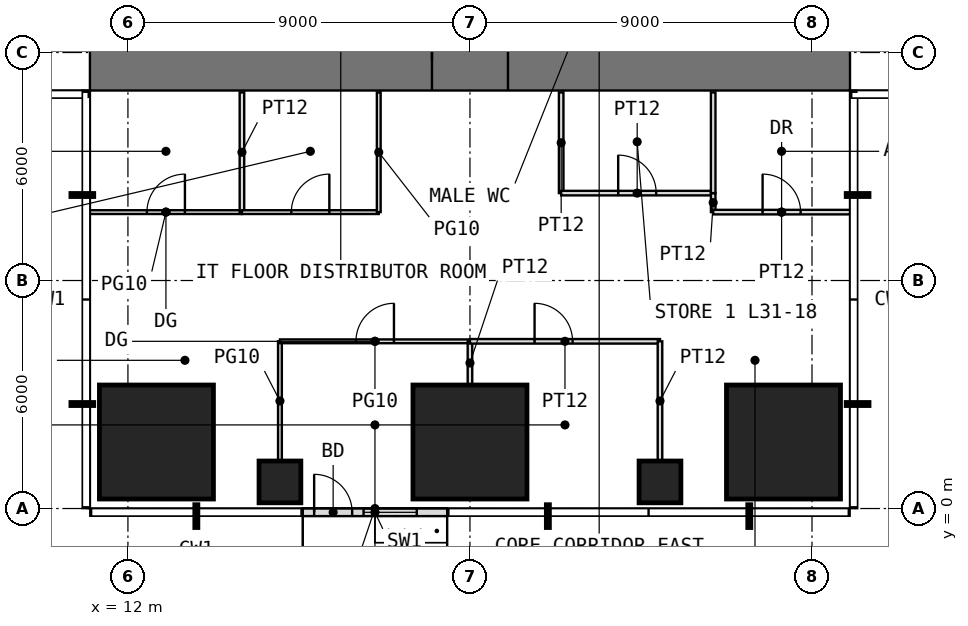
"""IFC4 building model, lengths in metres.
Left out: names, types, materials, properties, quantities, classifications, styles, units other than length and angle.
Written with IfcOpenShell. Run it as: python <this file> out.ifc"""

import sys

from ifc_helpers import new_model, si_unit, direction, frame, frame_2d, origin, origin_2d, place, context, subcontext, project, spatial, rectangle, extrude, element, fill, save


model = new_model("IFC4")
c1 = context("Model", 3, precision=1e-05, world=origin(), true_north=direction((0.0, 1.0)))
c2 = subcontext(c1, "Body", "Model", "MODEL_VIEW")
j1 = project(units=[si_unit("LENGTHUNIT", "METRE"), si_unit("PLANEANGLEUNIT", "RADIAN")], contexts=[c1])
p1 = place(None, origin())
s1 = spatial("IfcSite", under=j1, at=p1, CompositionType="ELEMENT")
p2 = place(p1, origin())
s2 = spatial("IfcBuilding", under=s1, at=p2, CompositionType="ELEMENT")
p3 = place(p2, frame((0.0, 0.0, 132.5)))
s3 = spatial("IfcBuildingStorey", under=s2, at=p3, CompositionType="ELEMENT", Elevation=132.5)
p4 = place(p3, frame((12.75, 1.75, 0.0), z_axis=(0.0, 0.0, 1.0), x_axis=(1.0, 0.0, 0.0)))
e1 = element("IfcColumn", 1, at=p4, inside=s3, PredefinedType="COLUMN", context=c2, shape_type="SweptSolid", body=[
    extrude(rectangle(XDim=3.0, YDim=3.0, at=origin_2d()), origin(), (0.0, 0.0, 1.0), 4.0),
])
p5 = place(p3, frame((16.0, 0.7, 0.0), z_axis=(0.0, 0.0, 1.0), x_axis=(1.0, 0.0, 0.0)))
e2 = element("IfcColumn", 2, at=p5, inside=s3, PredefinedType="COLUMN", context=c2, shape_type="SweptSolid", body=[
    extrude(rectangle(XDim=1.1, YDim=1.1, at=origin_2d()), origin(), (0.0, 0.0, 1.0), 4.0),
])
p6 = place(p3, frame((21.0, 1.75, 0.0), z_axis=(0.0, 0.0, 1.0), x_axis=(1.0, 0.0, 0.0)))
e3 = element("IfcColumn", 3, at=p6, inside=s3, PredefinedType="COLUMN", context=c2, shape_type="SweptSolid", body=[
    extrude(rectangle(XDim=3.0, YDim=3.0, at=origin_2d()), origin(), (0.0, 0.0, 1.0), 4.0),
])
p7 = place(p3, frame((26.0, 0.7, 0.0), z_axis=(0.0, 0.0, 1.0), x_axis=(1.0, 0.0, 0.0)))
e4 = element("IfcColumn", 4, at=p7, inside=s3, PredefinedType="COLUMN", context=c2, shape_type="SweptSolid", body=[
    extrude(rectangle(XDim=1.1, YDim=1.1, at=origin_2d()), origin(), (0.0, 0.0, 1.0), 4.0),
])
p8 = place(p3, frame((29.25, 1.75, 0.0), z_axis=(0.0, 0.0, 1.0), x_axis=(1.0, 0.0, 0.0)))
e5 = element("IfcColumn", 5, at=p8, inside=s3, PredefinedType="COLUMN", context=c2, shape_type="SweptSolid", body=[
    extrude(rectangle(XDim=3.0, YDim=3.0, at=origin_2d()), origin(), (0.0, 0.0, 1.0), 4.0),
])
p9 = place(p3, frame((16.6, -0.1, 0.0), z_axis=(0.0, 0.0, 1.0), x_axis=(1.0, 0.0, 0.0)))
e6 = element("IfcWall", 6, at=p9, inside=s3, PredefinedType="USERDEFINED", context=c2, shape_type="SweptSolid", body=[
    extrude(rectangle(XDim=3.8, YDim=0.2, at=frame_2d((1.9, 0.0))), origin(), (0.0, 0.0, 1.0), 3.75),
])
p10 = place(p9, frame((0.3, 0.0, 0.0)))
e7 = element("IfcOpeningElement", 7, at=p10, cuts=e6, PredefinedType="OPENING", context=c2, shape_type="SweptSolid", body=[
    extrude(rectangle(XDim=1.0, YDim=2.4, at=frame_2d((0.5, 1.2))), frame((0.0, 0.11, 0.0), z_axis=(0.0, -1.0, 0.0), x_axis=(1.0, 0.0, 0.0)), (0.0, 0.0, 1.0), 0.22),
])
p11 = place(p9, frame((1.6, 0.0, 0.3)))
e8 = element("IfcOpeningElement", 8, at=p11, cuts=e6, PredefinedType="OPENING", context=c2, shape_type="SweptSolid", body=[
    extrude(rectangle(XDim=1.4, YDim=2.7, at=frame_2d((0.7, 1.35))), frame((0.0, 0.11, 0.0), z_axis=(0.0, -1.0, 0.0), x_axis=(1.0, 0.0, 0.0)), (0.0, 0.0, 1.0), 0.22),
])
p12 = place(p3, frame((11.0, 11.8, -0.05), z_axis=(0.0, 0.0, 1.0), x_axis=(1.0, 0.0, 0.0)))
e9 = element("IfcWall", 9, at=p12, inside=s3, PredefinedType="SHEAR", context=c2, shape_type="SweptSolid", body=[
    extrude(rectangle(XDim=20.0, YDim=1.6, at=frame_2d((10.0, 0.0))), origin(), (0.0, 0.0, 1.0), 4.0),
])
p13 = place(p12, frame((9.0, 0.0, 0.05)))
e10 = element("IfcOpeningElement", 10, at=p13, cuts=e9, PredefinedType="OPENING", context=c2, shape_type="SweptSolid", body=[
    extrude(rectangle(XDim=2.0, YDim=2.2, at=frame_2d((1.0, 1.1))), frame((0.0, 0.81, 0.0), z_axis=(0.0, -1.0, 0.0), x_axis=(1.0, 0.0, 0.0)), (0.0, 0.0, 1.0), 1.62),
])
p14 = place(p3, frame((11.0, 7.8, 0.0), z_axis=(0.0, 0.0, 1.0), x_axis=(1.0, 0.0, 0.0)))
e11 = element("IfcWall", 11, at=p14, inside=s3, PredefinedType="PARTITIONING", context=c2, shape_type="SweptSolid", body=[
    extrude(rectangle(XDim=4.0, YDim=0.1, at=frame_2d((2.0, 0.0))), origin(), (0.0, 0.0, 1.0), 3.75),
])
p15 = place(p14, frame((1.5, 0.0, 0.0)))
e12 = element("IfcOpeningElement", 12, at=p15, cuts=e11, PredefinedType="OPENING", context=c2, shape_type="SweptSolid", body=[
    extrude(rectangle(XDim=1.0, YDim=2.4, at=frame_2d((0.5, 1.2))), frame((0.0, 0.06, 0.0), z_axis=(0.0, -1.0, 0.0), x_axis=(1.0, 0.0, 0.0)), (0.0, 0.0, 1.0), 0.12),
])
p16 = place(p3, frame((15.0, 7.8, 0.0), z_axis=(0.0, 0.0, 1.0), x_axis=(0.0, 1.0, 0.0)))
e13 = element("IfcWall", 13, at=p16, inside=s3, PredefinedType="PARTITIONING", context=c2, shape_type="SweptSolid", body=[
    extrude(rectangle(XDim=3.15, YDim=0.12, at=frame_2d((1.575, 0.0))), origin(), (0.0, 0.0, 1.0), 3.75),
])
p17 = place(p3, frame((15.0, 7.8, 0.0), z_axis=(0.0, 0.0, 1.0), x_axis=(1.0, 0.0, 0.0)))
e14 = element("IfcWall", 14, at=p17, inside=s3, PredefinedType="PARTITIONING", context=c2, shape_type="SweptSolid", body=[
    extrude(rectangle(XDim=3.6, YDim=0.1, at=frame_2d((1.8, 0.0))), origin(), (0.0, 0.0, 1.0), 3.75),
])
p18 = place(p17, frame((1.3, 0.0, 0.0)))
e15 = element("IfcOpeningElement", 15, at=p18, cuts=e14, PredefinedType="OPENING", context=c2, shape_type="SweptSolid", body=[
    extrude(rectangle(XDim=1.0, YDim=2.4, at=frame_2d((0.5, 1.2))), frame((0.0, 0.06, 0.0), z_axis=(0.0, -1.0, 0.0), x_axis=(1.0, 0.0, 0.0)), (0.0, 0.0, 1.0), 0.12),
])
p19 = place(p3, frame((16.0, 1.26, 0.0), z_axis=(0.0, 0.0, 1.0), x_axis=(0.0, 1.0, 0.0)))
e16 = element("IfcWall", 16, at=p19, inside=s3, PredefinedType="PARTITIONING", context=c2, shape_type="SweptSolid", body=[
    extrude(rectangle(XDim=3.14, YDim=0.1, at=frame_2d((1.57, 0.0))), origin(), (0.0, 0.0, 1.0), 3.75),
])
p20 = place(p3, frame((16.0, 4.4, 0.0), z_axis=(0.0, 0.0, 1.0), x_axis=(1.0, 0.0, 0.0)))
e17 = element("IfcWall", 17, at=p20, inside=s3, PredefinedType="PARTITIONING", context=c2, shape_type="SweptSolid", body=[
    extrude(rectangle(XDim=5.0, YDim=0.1, at=frame_2d((2.5, 0.0))), origin(), (0.0, 0.0, 1.0), 3.75),
])
p21 = place(p20, frame((2.0, 0.0, 0.0)))
e18 = element("IfcOpeningElement", 18, at=p21, cuts=e17, PredefinedType="OPENING", context=c2, shape_type="SweptSolid", body=[
    extrude(rectangle(XDim=1.0, YDim=2.4, at=frame_2d((0.5, 1.2))), frame((0.0, 0.06, 0.0), z_axis=(0.0, -1.0, 0.0), x_axis=(1.0, 0.0, 0.0)), (0.0, 0.0, 1.0), 0.12),
])
p22 = place(p3, frame((18.6, 7.8, 0.0), z_axis=(0.0, 0.0, 1.0), x_axis=(0.0, 1.0, 0.0)))
e19 = element("IfcWall", 19, at=p22, inside=s3, PredefinedType="PARTITIONING", context=c2, shape_type="SweptSolid", body=[
    extrude(rectangle(XDim=3.15, YDim=0.1, at=frame_2d((1.575, 0.0))), origin(), (0.0, 0.0, 1.0), 3.75),
])
p23 = place(p3, frame((21.0, 3.26, 0.0), z_axis=(0.0, 0.0, 1.0), x_axis=(0.0, 1.0, 0.0)))
e20 = element("IfcWall", 20, at=p23, inside=s3, PredefinedType="PARTITIONING", context=c2, shape_type="SweptSolid", body=[
    extrude(rectangle(XDim=1.14, YDim=0.12, at=frame_2d((0.57, 0.0))), origin(), (0.0, 0.0, 1.0), 3.75),
])
p24 = place(p3, frame((21.0, 4.4, 0.0), z_axis=(0.0, 0.0, 1.0), x_axis=(1.0, 0.0, 0.0)))
e21 = element("IfcWall", 21, at=p24, inside=s3, PredefinedType="PARTITIONING", context=c2, shape_type="SweptSolid", body=[
    extrude(rectangle(XDim=5.0, YDim=0.12, at=frame_2d((2.5, 0.0))), origin(), (0.0, 0.0, 1.0), 3.75),
])
p25 = place(p24, frame((1.7, 0.0, 0.0)))
e22 = element("IfcOpeningElement", 22, at=p25, cuts=e21, PredefinedType="OPENING", context=c2, shape_type="SweptSolid", body=[
    extrude(rectangle(XDim=1.0, YDim=2.2, at=frame_2d((0.5, 1.1))), frame((0.0, 0.07, 0.0), z_axis=(0.0, -1.0, 0.0), x_axis=(1.0, 0.0, 0.0)), (0.0, 0.0, 1.0), 0.14),
])
p26 = place(p3, frame((23.4, 8.3, 0.0), z_axis=(0.0, 0.0, 1.0), x_axis=(0.0, 1.0, 0.0)))
e23 = element("IfcWall", 23, at=p26, inside=s3, PredefinedType="PARTITIONING", context=c2, shape_type="SweptSolid", body=[
    extrude(rectangle(XDim=2.65, YDim=0.12, at=frame_2d((1.325, 0.0))), origin(), (0.0, 0.0, 1.0), 3.75),
])
p27 = place(p3, frame((23.4, 8.3, 0.0), z_axis=(0.0, 0.0, 1.0), x_axis=(1.0, 0.0, 0.0)))
e24 = element("IfcWall", 24, at=p27, inside=s3, PredefinedType="PARTITIONING", context=c2, shape_type="SweptSolid", body=[
    extrude(rectangle(XDim=4.0, YDim=0.12, at=frame_2d((2.0, 0.0))), origin(), (0.0, 0.0, 1.0), 3.75),
])
p28 = place(p27, frame((1.5, 0.0, 0.0)))
e25 = element("IfcOpeningElement", 25, at=p28, cuts=e24, PredefinedType="OPENING", context=c2, shape_type="SweptSolid", body=[
    extrude(rectangle(XDim=1.0, YDim=2.2, at=frame_2d((0.5, 1.1))), frame((0.0, 0.07, 0.0), z_axis=(0.0, -1.0, 0.0), x_axis=(1.0, 0.0, 0.0)), (0.0, 0.0, 1.0), 0.14),
])
p29 = place(p3, frame((26.0, 1.26, 0.0), z_axis=(0.0, 0.0, 1.0), x_axis=(0.0, 1.0, 0.0)))
e26 = element("IfcWall", 26, at=p29, inside=s3, PredefinedType="PARTITIONING", context=c2, shape_type="SweptSolid", body=[
    extrude(rectangle(XDim=3.14, YDim=0.12, at=frame_2d((1.57, 0.0))), origin(), (0.0, 0.0, 1.0), 3.75),
])
p30 = place(p3, frame((27.4, 7.8, 0.0), z_axis=(0.0, 0.0, 1.0), x_axis=(0.0, 1.0, 0.0)))
e27 = element("IfcWall", 27, at=p30, inside=s3, PredefinedType="PARTITIONING", context=c2, shape_type="SweptSolid", body=[
    extrude(rectangle(XDim=0.5, YDim=0.12, at=frame_2d((0.25, 0.0))), origin(), (0.0, 0.0, 1.0), 3.75),
])
p31 = place(p3, frame((27.4, 7.8, 0.0), z_axis=(0.0, 0.0, 1.0), x_axis=(1.0, 0.0, 0.0)))
e28 = element("IfcWall", 28, at=p31, inside=s3, PredefinedType="PARTITIONING", context=c2, shape_type="SweptSolid", body=[
    extrude(rectangle(XDim=3.6, YDim=0.12, at=frame_2d((1.8, 0.0))), origin(), (0.0, 0.0, 1.0), 3.75),
])
p32 = place(p31, frame((1.3, 0.0, 0.0)))
e29 = element("IfcOpeningElement", 29, at=p32, cuts=e28, PredefinedType="OPENING", context=c2, shape_type="SweptSolid", body=[
    extrude(rectangle(XDim=1.0, YDim=2.2, at=frame_2d((0.5, 1.1))), frame((0.0, 0.07, 0.0), z_axis=(0.0, -1.0, 0.0), x_axis=(1.0, 0.0, 0.0)), (0.0, 0.0, 1.0), 0.14),
])
p33 = place(p3, frame((27.4, 8.3, 0.0), z_axis=(0.0, 0.0, 1.0), x_axis=(0.0, 1.0, 0.0)))
e30 = element("IfcWall", 30, at=p33, inside=s3, PredefinedType="PARTITIONING", context=c2, shape_type="SweptSolid", body=[
    extrude(rectangle(XDim=2.65, YDim=0.12, at=frame_2d((1.325, 0.0))), origin(), (0.0, 0.0, 1.0), 3.75),
])
p34 = place(p10, origin())
e31 = element("IfcDoor", 31, at=p34, inside=s3, OperationType="SINGLE_SWING_LEFT", PredefinedType="DOOR", context=c2, shape_type="SweptSolid", body=[
    extrude(rectangle(XDim=1.0, YDim=2.4, at=frame_2d((0.5, 1.2))), frame((0.0, 0.025, 0.0), z_axis=(0.0, -1.0, 0.0), x_axis=(1.0, 0.0, 0.0)), (0.0, 0.0, 1.0), 0.05),
])
fill(e7, e31)
p35 = place(p11, origin())
e32 = element("IfcWindow", 32, at=p35, inside=s3, PartitioningType="SINGLE_PANEL", PredefinedType="WINDOW", context=c2, shape_type="SweptSolid", body=[
    extrude(rectangle(XDim=1.4, YDim=2.7, at=frame_2d((0.7, 1.35))), frame((0.0, 0.03, 0.0), z_axis=(0.0, -1.0, 0.0), x_axis=(1.0, 0.0, 0.0)), (0.0, 0.0, 1.0), 0.06),
])
fill(e8, e32)
p36 = place(p13, origin())
e33 = element("IfcDoor", 33, at=p36, inside=s3, OperationType="DOUBLE_DOOR_SINGLE_SWING", PredefinedType="DOOR", context=c2, shape_type="SweptSolid", body=[
    extrude(rectangle(XDim=2.0, YDim=2.2, at=frame_2d((1.0, 1.1))), frame((0.0, 0.025, 0.0), z_axis=(0.0, -1.0, 0.0), x_axis=(1.0, 0.0, 0.0)), (0.0, 0.0, 1.0), 0.05),
])
fill(e10, e33)
p37 = place(p15, origin())
e34 = element("IfcDoor", 34, at=p37, inside=s3, OperationType="SINGLE_SWING_RIGHT", PredefinedType="DOOR", context=c2, shape_type="SweptSolid", body=[
    extrude(rectangle(XDim=1.0, YDim=2.4, at=frame_2d((0.5, 1.2))), frame((0.0, 0.025, 0.0), z_axis=(0.0, -1.0, 0.0), x_axis=(1.0, 0.0, 0.0)), (0.0, 0.0, 1.0), 0.05),
])
fill(e12, e34)
p38 = place(p18, origin())
e35 = element("IfcDoor", 35, at=p38, inside=s3, OperationType="SINGLE_SWING_RIGHT", PredefinedType="DOOR", context=c2, shape_type="SweptSolid", body=[
    extrude(rectangle(XDim=1.0, YDim=2.4, at=frame_2d((0.5, 1.2))), frame((0.0, 0.025, 0.0), z_axis=(0.0, -1.0, 0.0), x_axis=(1.0, 0.0, 0.0)), (0.0, 0.0, 1.0), 0.05),
])
fill(e15, e35)
p39 = place(p28, origin())
e36 = element("IfcDoor", 36, at=p39, inside=s3, OperationType="SINGLE_SWING_LEFT", PredefinedType="DOOR", context=c2, shape_type="SweptSolid", body=[
    extrude(rectangle(XDim=1.0, YDim=2.2, at=frame_2d((0.5, 1.1))), frame((0.0, 0.025, 0.0), z_axis=(0.0, -1.0, 0.0), x_axis=(1.0, 0.0, 0.0)), (0.0, 0.0, 1.0), 0.05),
])
fill(e25, e36)
p40 = place(p32, origin())
e37 = element("IfcDoor", 37, at=p40, inside=s3, OperationType="SINGLE_SWING_LEFT", PredefinedType="DOOR", context=c2, shape_type="SweptSolid", body=[
    extrude(rectangle(XDim=1.0, YDim=2.2, at=frame_2d((0.5, 1.1))), frame((0.0, 0.025, 0.0), z_axis=(0.0, -1.0, 0.0), x_axis=(1.0, 0.0, 0.0)), (0.0, 0.0, 1.0), 0.05),
])
fill(e29, e37)
p41 = place(p21, origin())
e38 = element("IfcDoor", 38, at=p41, inside=s3, OperationType="SINGLE_SWING_RIGHT", PredefinedType="DOOR", context=c2, shape_type="SweptSolid", body=[
    extrude(rectangle(XDim=1.0, YDim=2.4, at=frame_2d((0.5, 1.2))), frame((0.0, 0.025, 0.0), z_axis=(0.0, -1.0, 0.0), x_axis=(1.0, 0.0, 0.0)), (0.0, 0.0, 1.0), 0.05),
])
fill(e18, e38)
p42 = place(p25, origin())
e39 = element("IfcDoor", 39, at=p42, inside=s3, OperationType="SINGLE_SWING_LEFT", PredefinedType="DOOR", context=c2, shape_type="SweptSolid", body=[
    extrude(rectangle(XDim=1.0, YDim=2.2, at=frame_2d((0.5, 1.1))), frame((0.0, 0.025, 0.0), z_axis=(0.0, -1.0, 0.0), x_axis=(1.0, 0.0, 0.0)), (0.0, 0.0, 1.0), 0.05),
])
fill(e22, e39)
save(model, sys.argv[1])
